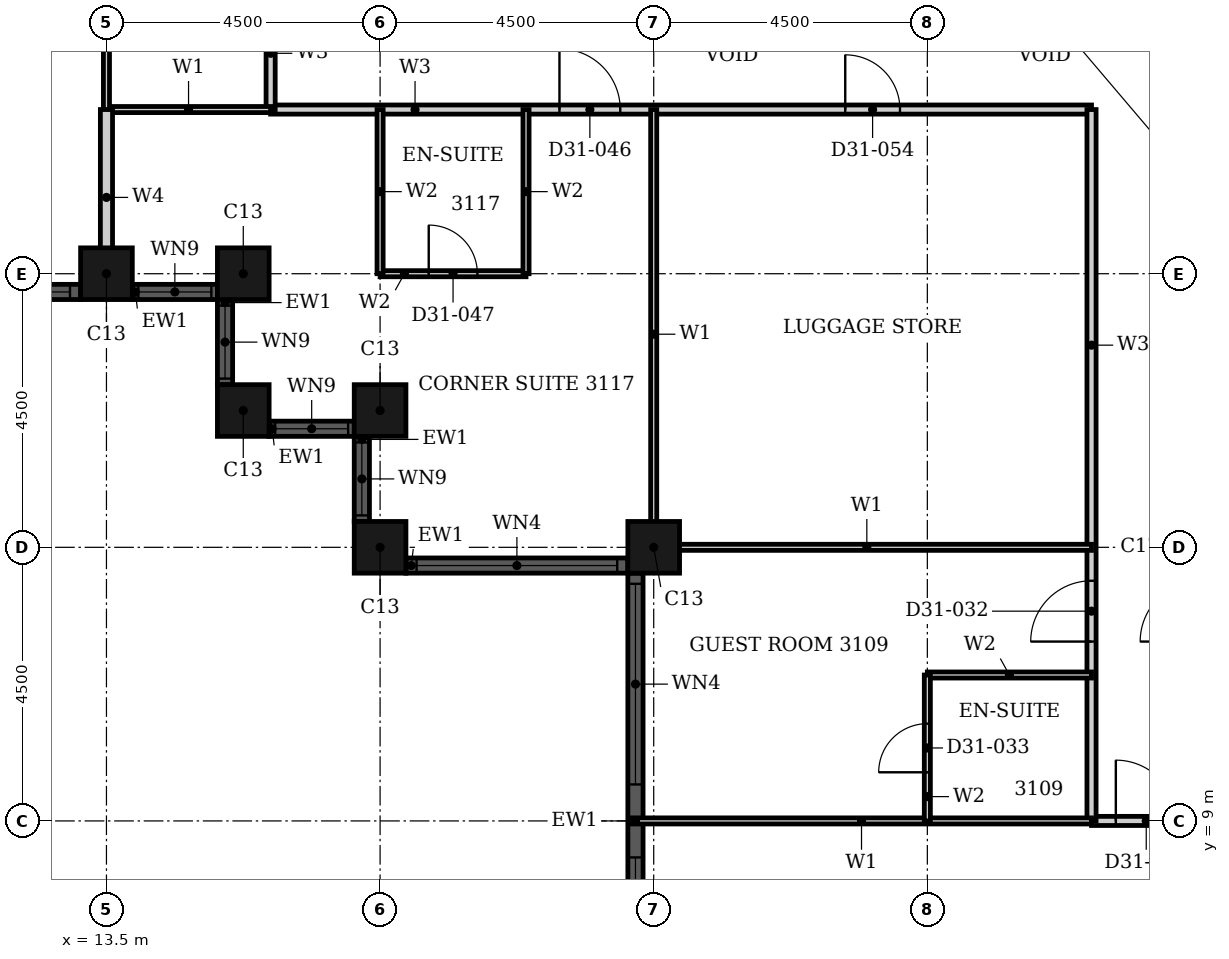
"""IFC4 building model, lengths in metres.
Left out: names, types, materials, properties, quantities, classifications, styles, units other than length and angle.
Written with IfcOpenShell. Run it as: python <this file> out.ifc"""

import sys

from ifc_helpers import new_model, si_unit, direction, frame, frame_2d, origin, origin_2d, place, context, subcontext, project, spatial, rectangle, hollow_rectangle, extrude, element, fill, save


model = new_model("IFC4")
c1 = context("Model", 3, precision=1e-05, world=origin(), true_north=direction((0.0, 1.0)))
c2 = subcontext(c1, "Body", "Model", "MODEL_VIEW")
j1 = project(units=[si_unit("LENGTHUNIT", "METRE"), si_unit("PLANEANGLEUNIT", "RADIAN")], contexts=[c1])
p1 = place(None, origin())
s1 = spatial("IfcSite", under=j1, at=p1, CompositionType="ELEMENT")
p2 = place(p1, origin())
s2 = spatial("IfcBuilding", under=s1, at=p2, CompositionType="ELEMENT")
p3 = place(p2, frame((0.0, 0.0, 126.0)))
s3 = spatial("IfcBuildingStorey", under=s2, at=p3, CompositionType="ELEMENT", Elevation=126.0)
for number, where, z_axis, x_axis in (
    (1, (13.5, 18.0, 0.0), (0.0, 0.0, 1.0), (1.0, 0.0, 0.0)),
    (2, (15.75, 18.0, 0.0), (0.0, 0.0, 1.0), (1.0, 0.0, 0.0)),
    (3, (15.75, 15.75, 0.0), (0.0, 0.0, 1.0), (1.0, 0.0, 0.0)),
    (4, (18.0, 15.75, 0.0), (0.0, 0.0, 1.0), (1.0, 0.0, 0.0)),
    (5, (18.0, 13.5, 0.0), (0.0, 0.0, 1.0), (1.0, 0.0, 0.0)),
    (6, (22.5, 13.5, 0.0), (0.0, 0.0, 1.0), (1.0, 0.0, 0.0)),
):
    element("IfcColumn", number, at=place(p3, frame(where, z_axis=z_axis, x_axis=x_axis)), inside=s3, PredefinedType="COLUMN", context=c2, shape_type="SweptSolid", body=[
        extrude(hollow_rectangle(XDim=0.85, YDim=0.85, WallThickness=0.026, at=origin_2d()), origin(), (0.0, 0.0, 1.0), 3.6),
    ])
p4 = place(p3, frame((4.925, 17.7, 0.0), z_axis=(0.0, 0.0, 1.0), x_axis=(1.0, 0.0, 0.0)))
e7 = element("IfcWall", 7, at=p4, inside=s3, PredefinedType="SOLIDWALL", context=c2, shape_type="SweptSolid", body=[
    extrude(rectangle(XDim=8.15, YDim=0.25, at=frame_2d((4.075, 0.0))), origin(), (0.0, 0.0, 1.0), 3.6),
])
p5 = place(p4, frame((0.175, 0.0, 0.9)))
e8 = element("IfcOpeningElement", 8, at=p5, cuts=e7, PredefinedType="OPENING", context=c2, shape_type="SweptSolid", body=[
    extrude(rectangle(XDim=3.3, YDim=2.08, at=frame_2d((1.65, 1.04))), frame((0.0, 0.135, 0.0), z_axis=(0.0, -1.0, 0.0), x_axis=(1.0, 0.0, 0.0)), (0.0, 0.0, 1.0), 0.27),
])
p6 = place(p4, frame((4.675, 0.0, 0.9)))
e9 = element("IfcOpeningElement", 9, at=p6, cuts=e7, PredefinedType="OPENING", context=c2, shape_type="SweptSolid", body=[
    extrude(rectangle(XDim=3.3, YDim=2.08, at=frame_2d((1.65, 1.04))), frame((0.0, 0.135, 0.0), z_axis=(0.0, -1.0, 0.0), x_axis=(1.0, 0.0, 0.0)), (0.0, 0.0, 1.0), 0.27),
])
p7 = place(p3, frame((13.925, 17.7, 0.0), z_axis=(0.0, 0.0, 1.0), x_axis=(1.0, 0.0, 0.0)))
e10 = element("IfcWall", 10, at=p7, inside=s3, PredefinedType="SOLIDWALL", context=c2, shape_type="SweptSolid", body=[
    extrude(rectangle(XDim=1.4, YDim=0.25, at=frame_2d((0.7, 0.0))), origin(), (0.0, 0.0, 1.0), 3.6),
])
p8 = place(p7, frame((0.1, 0.0, 0.9)))
e11 = element("IfcOpeningElement", 11, at=p8, cuts=e10, PredefinedType="OPENING", context=c2, shape_type="SweptSolid", body=[
    extrude(rectangle(XDim=1.2, YDim=2.08, at=frame_2d((0.6, 1.04))), frame((0.0, 0.135, 0.0), z_axis=(0.0, -1.0, 0.0), x_axis=(1.0, 0.0, 0.0)), (0.0, 0.0, 1.0), 0.27),
])
p9 = place(p3, frame((15.45, 17.575, 0.0), z_axis=(0.0, 0.0, 1.0), x_axis=(0.0, -1.0, 0.0)))
e12 = element("IfcWall", 12, at=p9, inside=s3, PredefinedType="SOLIDWALL", context=c2, shape_type="SweptSolid", body=[
    extrude(rectangle(XDim=1.4, YDim=0.25, at=frame_2d((0.7, 0.0))), origin(), (0.0, 0.0, 1.0), 3.6),
])
p10 = place(p9, frame((0.1, 0.0, 0.9)))
e13 = element("IfcOpeningElement", 13, at=p10, cuts=e12, PredefinedType="OPENING", context=c2, shape_type="SweptSolid", body=[
    extrude(rectangle(XDim=1.2, YDim=2.08, at=frame_2d((0.6, 1.04))), frame((0.0, 0.135, 0.0), z_axis=(0.0, -1.0, 0.0), x_axis=(1.0, 0.0, 0.0)), (0.0, 0.0, 1.0), 0.27),
])
p11 = place(p3, frame((16.175, 15.45, 0.0), z_axis=(0.0, 0.0, 1.0), x_axis=(1.0, 0.0, 0.0)))
e14 = element("IfcWall", 14, at=p11, inside=s3, PredefinedType="SOLIDWALL", context=c2, shape_type="SweptSolid", body=[
    extrude(rectangle(XDim=1.4, YDim=0.25, at=frame_2d((0.7, 0.0))), origin(), (0.0, 0.0, 1.0), 3.6),
])
p12 = place(p11, frame((0.1, 0.0, 0.9)))
e15 = element("IfcOpeningElement", 15, at=p12, cuts=e14, PredefinedType="OPENING", context=c2, shape_type="SweptSolid", body=[
    extrude(rectangle(XDim=1.2, YDim=2.08, at=frame_2d((0.6, 1.04))), frame((0.0, 0.135, 0.0), z_axis=(0.0, -1.0, 0.0), x_axis=(1.0, 0.0, 0.0)), (0.0, 0.0, 1.0), 0.27),
])
p13 = place(p3, frame((17.7, 15.325, 0.0), z_axis=(0.0, 0.0, 1.0), x_axis=(0.0, -1.0, 0.0)))
e16 = element("IfcWall", 16, at=p13, inside=s3, PredefinedType="SOLIDWALL", context=c2, shape_type="SweptSolid", body=[
    extrude(rectangle(XDim=1.4, YDim=0.25, at=frame_2d((0.7, 0.0))), origin(), (0.0, 0.0, 1.0), 3.6),
])
p14 = place(p13, frame((0.1, 0.0, 0.9)))
e17 = element("IfcOpeningElement", 17, at=p14, cuts=e16, PredefinedType="OPENING", context=c2, shape_type="SweptSolid", body=[
    extrude(rectangle(XDim=1.2, YDim=2.08, at=frame_2d((0.6, 1.04))), frame((0.0, 0.135, 0.0), z_axis=(0.0, -1.0, 0.0), x_axis=(1.0, 0.0, 0.0)), (0.0, 0.0, 1.0), 0.27),
])
p15 = place(p3, frame((18.425, 13.2, 0.0), z_axis=(0.0, 0.0, 1.0), x_axis=(1.0, 0.0, 0.0)))
e18 = element("IfcWall", 18, at=p15, inside=s3, PredefinedType="SOLIDWALL", context=c2, shape_type="SweptSolid", body=[
    extrude(rectangle(XDim=3.65, YDim=0.25, at=frame_2d((1.825, 0.0))), origin(), (0.0, 0.0, 1.0), 3.6),
])
p16 = place(p15, frame((0.175, 0.0, 0.9)))
e19 = element("IfcOpeningElement", 19, at=p16, cuts=e18, PredefinedType="OPENING", context=c2, shape_type="SweptSolid", body=[
    extrude(rectangle(XDim=3.3, YDim=2.08, at=frame_2d((1.65, 1.04))), frame((0.0, 0.135, 0.0), z_axis=(0.0, -1.0, 0.0), x_axis=(1.0, 0.0, 0.0)), (0.0, 0.0, 1.0), 0.27),
])
p17 = place(p3, frame((22.2, 13.075, 0.0), z_axis=(0.0, 0.0, 1.0), x_axis=(0.0, -1.0, 0.0)))
e20 = element("IfcWall", 20, at=p17, inside=s3, PredefinedType="SOLIDWALL", context=c2, shape_type="SweptSolid", body=[
    extrude(rectangle(XDim=8.15, YDim=0.25, at=frame_2d((4.075, 0.0))), origin(), (0.0, 0.0, 1.0), 3.6),
])
p18 = place(p17, frame((0.175, 0.0, 0.9)))
e21 = element("IfcOpeningElement", 21, at=p18, cuts=e20, PredefinedType="OPENING", context=c2, shape_type="SweptSolid", body=[
    extrude(rectangle(XDim=3.3, YDim=2.08, at=frame_2d((1.65, 1.04))), frame((0.0, 0.135, 0.0), z_axis=(0.0, -1.0, 0.0), x_axis=(1.0, 0.0, 0.0)), (0.0, 0.0, 1.0), 0.27),
])
p19 = place(p17, frame((4.675, 0.0, 0.9)))
e22 = element("IfcOpeningElement", 22, at=p19, cuts=e20, PredefinedType="OPENING", context=c2, shape_type="SweptSolid", body=[
    extrude(rectangle(XDim=3.3, YDim=2.08, at=frame_2d((1.65, 1.04))), frame((0.0, 0.135, 0.0), z_axis=(0.0, -1.0, 0.0), x_axis=(1.0, 0.0, 0.0)), (0.0, 0.0, 1.0), 0.27),
])
p20 = place(p3, frame((16.2, 20.7, 0.0), z_axis=(0.0, 0.0, 1.0), x_axis=(1.0, 0.0, 0.0)))
e23 = element("IfcWall", 23, at=p20, inside=s3, PredefinedType="PARTITIONING", context=c2, shape_type="SweptSolid", body=[
    extrude(rectangle(XDim=13.5, YDim=0.15, at=frame_2d((6.75, 0.0))), origin(), (0.0, 0.0, 1.0), 3.3),
])
p21 = place(p20, frame((4.75, 0.0, 0.0)))
e24 = element("IfcOpeningElement", 24, at=p21, cuts=e23, PredefinedType="OPENING", context=c2, shape_type="SweptSolid", body=[
    extrude(rectangle(XDim=1.0, YDim=2.1, at=frame_2d((0.5, 1.05))), frame((0.0, 0.085, 0.0), z_axis=(0.0, -1.0, 0.0), x_axis=(1.0, 0.0, 0.0)), (0.0, 0.0, 1.0), 0.17),
])
p22 = place(p20, frame((9.45, 0.0, 0.0)))
e25 = element("IfcOpeningElement", 25, at=p22, cuts=e23, PredefinedType="OPENING", context=c2, shape_type="SweptSolid", body=[
    extrude(rectangle(XDim=0.9, YDim=2.1, at=frame_2d((0.45, 1.05))), frame((0.0, 0.085, 0.0), z_axis=(0.0, -1.0, 0.0), x_axis=(1.0, 0.0, 0.0)), (0.0, 0.0, 1.0), 0.17),
])
p23 = place(p3, frame((29.7, 9.0, 0.0), z_axis=(0.0, 0.0, 1.0), x_axis=(1.0, 0.0, 0.0)))
e26 = element("IfcWall", 26, at=p23, inside=s3, PredefinedType="PARTITIONING", context=c2, shape_type="SweptSolid", body=[
    extrude(rectangle(XDim=1.8, YDim=0.15, at=frame_2d((0.9, 0.0))), origin(), (0.0, 0.0, 1.0), 3.3),
])
p24 = place(p23, frame((0.4, 0.0, 0.0)))
e27 = element("IfcOpeningElement", 27, at=p24, cuts=e26, PredefinedType="OPENING", context=c2, shape_type="SweptSolid", body=[
    extrude(rectangle(XDim=1.0, YDim=2.1, at=frame_2d((0.5, 1.05))), frame((0.0, 0.085, 0.0), z_axis=(0.0, -1.0, 0.0), x_axis=(1.0, 0.0, 0.0)), (0.0, 0.0, 1.0), 0.17),
])
p25 = place(p3, frame((16.2, 20.7, 0.0), z_axis=(0.0, 0.0, 1.0), x_axis=(0.0, 1.0, 0.0)))
e28 = element("IfcWall", 28, at=p25, inside=s3, PredefinedType="PARTITIONING", context=c2, shape_type="SweptSolid", body=[
    extrude(rectangle(XDim=4.5, YDim=0.15, at=frame_2d((2.25, 0.0))), origin(), (0.0, 0.0, 1.0), 3.3),
])
p26 = place(p25, frame((1.85, 0.0, 0.0)))
e29 = element("IfcOpeningElement", 29, at=p26, cuts=e28, PredefinedType="OPENING", context=c2, shape_type="SweptSolid", body=[
    extrude(rectangle(XDim=0.9, YDim=2.1, at=frame_2d((0.45, 1.05))), frame((0.0, 0.085, 0.0), z_axis=(0.0, -1.0, 0.0), x_axis=(1.0, 0.0, 0.0)), (0.0, 0.0, 1.0), 0.17),
])
p27 = place(p3, frame((29.7, 9.0, 0.0), z_axis=(0.0, 0.0, 1.0), x_axis=(0.0, 1.0, 0.0)))
e30 = element("IfcWall", 30, at=p27, inside=s3, PredefinedType="PARTITIONING", context=c2, shape_type="SweptSolid", body=[
    extrude(rectangle(XDim=11.7, YDim=0.15, at=frame_2d((5.85, 0.0))), origin(), (0.0, 0.0, 1.0), 3.3),
])
p28 = place(p27, frame((2.95, 0.0, 0.0)))
e31 = element("IfcOpeningElement", 31, at=p28, cuts=e30, PredefinedType="OPENING", context=c2, shape_type="SweptSolid", body=[
    extrude(rectangle(XDim=1.0, YDim=2.1, at=frame_2d((0.5, 1.05))), frame((0.0, 0.085, 0.0), z_axis=(0.0, -1.0, 0.0), x_axis=(1.0, 0.0, 0.0)), (0.0, 0.0, 1.0), 0.17),
])
p29 = place(p3, frame((22.31, 13.5, 0.0), z_axis=(0.0, 0.0, 1.0), x_axis=(1.0, 0.0, 0.0)))
e32 = element("IfcWall", 32, at=p29, inside=s3, PredefinedType="PARTITIONING", context=c2, shape_type="SweptSolid", body=[
    extrude(rectangle(XDim=7.39, YDim=0.1, at=frame_2d((3.695, 0.0))), origin(), (0.0, 0.0, 1.0), 2.38),
])
p30 = place(p3, frame((13.5, 20.7, 0.0), z_axis=(0.0, 0.0, 1.0), x_axis=(1.0, 0.0, 0.0)))
e33 = element("IfcWall", 33, at=p30, inside=s3, PredefinedType="PARTITIONING", context=c2, shape_type="SweptSolid", body=[
    extrude(rectangle(XDim=2.7, YDim=0.1, at=frame_2d((1.35, 0.0))), origin(), (0.0, 0.0, 1.0), 3.3),
])
p31 = place(p3, frame((22.135, 9.0, 0.0), z_axis=(0.0, 0.0, 1.0), x_axis=(1.0, 0.0, 0.0)))
e34 = element("IfcWall", 34, at=p31, inside=s3, PredefinedType="PARTITIONING", context=c2, shape_type="SweptSolid", body=[
    extrude(rectangle(XDim=7.565, YDim=0.1, at=frame_2d((3.782, 0.0))), origin(), (0.0, 0.0, 1.0), 3.3),
])
p32 = place(p3, frame((13.5, 20.7, 0.0), z_axis=(0.0, 0.0, 1.0), x_axis=(0.0, 1.0, 0.0)))
e35 = element("IfcWall", 35, at=p32, inside=s3, PredefinedType="PARTITIONING", context=c2, shape_type="SweptSolid", body=[
    extrude(rectangle(XDim=4.5, YDim=0.1, at=frame_2d((2.25, 0.0))), origin(), (0.0, 0.0, 1.0), 2.38),
])
p33 = place(p3, frame((22.5, 13.31, 0.0), z_axis=(0.0, 0.0, 1.0), x_axis=(0.0, 1.0, 0.0)))
e36 = element("IfcWall", 36, at=p33, inside=s3, PredefinedType="PARTITIONING", context=c2, shape_type="SweptSolid", body=[
    extrude(rectangle(XDim=7.39, YDim=0.1, at=frame_2d((3.695, 0.0))), origin(), (0.0, 0.0, 1.0), 3.3),
])
p34 = place(p3, frame((13.5, 17.81, 0.0), z_axis=(0.0, 0.0, 1.0), x_axis=(0.0, 1.0, 0.0)))
e37 = element("IfcWall", 37, at=p34, inside=s3, PredefinedType="PARTITIONING", context=c2, shape_type="SweptSolid", body=[
    extrude(rectangle(XDim=2.89, YDim=0.2, at=frame_2d((1.445, 0.0))), origin(), (0.0, 0.0, 1.0), 2.38),
])
p35 = place(p3, frame((27.0, 11.4, 0.0), z_axis=(0.0, 0.0, 1.0), x_axis=(1.0, 0.0, 0.0)))
e38 = element("IfcWall", 38, at=p35, inside=s3, PredefinedType="PARTITIONING", context=c2, shape_type="SweptSolid", body=[
    extrude(rectangle(XDim=2.7, YDim=0.1, at=frame_2d((1.35, 0.0))), origin(), (0.0, 0.0, 1.0), 3.3),
])
p36 = place(p3, frame((18.0, 18.0, 0.0), z_axis=(0.0, 0.0, 1.0), x_axis=(1.0, 0.0, 0.0)))
e39 = element("IfcWall", 39, at=p36, inside=s3, PredefinedType="PARTITIONING", context=c2, shape_type="SweptSolid", body=[
    extrude(rectangle(XDim=2.4, YDim=0.1, at=frame_2d((1.2, 0.0))), origin(), (0.0, 0.0, 1.0), 3.3),
])
p37 = place(p36, frame((0.8, 0.0, 0.0)))
e40 = element("IfcOpeningElement", 40, at=p37, cuts=e39, PredefinedType="OPENING", context=c2, shape_type="SweptSolid", body=[
    extrude(rectangle(XDim=0.8, YDim=2.1, at=frame_2d((0.4, 1.05))), frame((0.0, 0.06, 0.0), z_axis=(0.0, -1.0, 0.0), x_axis=(1.0, 0.0, 0.0)), (0.0, 0.0, 1.0), 0.12),
])
for number, where, z_axis, x_axis in (
    (41, (18.0, 18.0, 0.0), (0.0, 0.0, 1.0), (0.0, 1.0, 0.0)),
    (42, (20.4, 18.0, 0.0), (0.0, 0.0, 1.0), (0.0, 1.0, 0.0)),
):
    element("IfcWall", number, at=place(p3, frame(where, z_axis=z_axis, x_axis=x_axis)), inside=s3, PredefinedType="PARTITIONING", context=c2, shape_type="SweptSolid", body=[
        extrude(rectangle(XDim=2.7, YDim=0.1, at=frame_2d((1.35, 0.0))), origin(), (0.0, 0.0, 1.0), 3.3),
    ])
p38 = place(p3, frame((27.0, 9.0, 0.0), z_axis=(0.0, 0.0, 1.0), x_axis=(0.0, 1.0, 0.0)))
e43 = element("IfcWall", 43, at=p38, inside=s3, PredefinedType="PARTITIONING", context=c2, shape_type="SweptSolid", body=[
    extrude(rectangle(XDim=2.4, YDim=0.1, at=frame_2d((1.2, 0.0))), origin(), (0.0, 0.0, 1.0), 2.58),
])
p39 = place(p38, frame((0.8, 0.0, 0.0)))
e44 = element("IfcOpeningElement", 44, at=p39, cuts=e43, PredefinedType="OPENING", context=c2, shape_type="SweptSolid", body=[
    extrude(rectangle(XDim=0.8, YDim=2.1, at=frame_2d((0.4, 1.05))), frame((0.0, 0.06, 0.0), z_axis=(0.0, -1.0, 0.0), x_axis=(1.0, 0.0, 0.0)), (0.0, 0.0, 1.0), 0.12),
])
p40 = place(p6, origin())
e45 = element("IfcWindow", 45, at=p40, inside=s3, PartitioningType="SINGLE_PANEL", PredefinedType="WINDOW", context=c2, shape_type="SweptSolid", body=[
    extrude(rectangle(XDim=3.3, YDim=2.08, at=frame_2d((1.65, 1.04))), frame((0.0, 0.03, 0.0), z_axis=(0.0, -1.0, 0.0), x_axis=(1.0, 0.0, 0.0)), (0.0, 0.0, 1.0), 0.06),
])
fill(e9, e45)
p41 = place(p8, origin())
e46 = element("IfcWindow", 46, at=p41, inside=s3, PartitioningType="SINGLE_PANEL", PredefinedType="WINDOW", context=c2, shape_type="SweptSolid", body=[
    extrude(rectangle(XDim=1.2, YDim=2.08, at=frame_2d((0.6, 1.04))), frame((0.0, 0.03, 0.0), z_axis=(0.0, -1.0, 0.0), x_axis=(1.0, 0.0, 0.0)), (0.0, 0.0, 1.0), 0.06),
])
fill(e11, e46)
p42 = place(p10, origin())
e47 = element("IfcWindow", 47, at=p42, inside=s3, PartitioningType="SINGLE_PANEL", PredefinedType="WINDOW", context=c2, shape_type="SweptSolid", body=[
    extrude(rectangle(XDim=1.2, YDim=2.08, at=frame_2d((0.6, 1.04))), frame((0.0, 0.03, 0.0), z_axis=(0.0, -1.0, 0.0), x_axis=(1.0, 0.0, 0.0)), (0.0, 0.0, 1.0), 0.06),
])
fill(e13, e47)
p43 = place(p12, origin())
e48 = element("IfcWindow", 48, at=p43, inside=s3, PartitioningType="SINGLE_PANEL", PredefinedType="WINDOW", context=c2, shape_type="SweptSolid", body=[
    extrude(rectangle(XDim=1.2, YDim=2.08, at=frame_2d((0.6, 1.04))), frame((0.0, 0.03, 0.0), z_axis=(0.0, -1.0, 0.0), x_axis=(1.0, 0.0, 0.0)), (0.0, 0.0, 1.0), 0.06),
])
fill(e15, e48)
p44 = place(p14, origin())
e49 = element("IfcWindow", 49, at=p44, inside=s3, PartitioningType="SINGLE_PANEL", PredefinedType="WINDOW", context=c2, shape_type="SweptSolid", body=[
    extrude(rectangle(XDim=1.2, YDim=2.08, at=frame_2d((0.6, 1.04))), frame((0.0, 0.03, 0.0), z_axis=(0.0, -1.0, 0.0), x_axis=(1.0, 0.0, 0.0)), (0.0, 0.0, 1.0), 0.06),
])
fill(e17, e49)
p45 = place(p16, origin())
e50 = element("IfcWindow", 50, at=p45, inside=s3, PartitioningType="SINGLE_PANEL", PredefinedType="WINDOW", context=c2, shape_type="SweptSolid", body=[
    extrude(rectangle(XDim=3.3, YDim=2.08, at=frame_2d((1.65, 1.04))), frame((0.0, 0.03, 0.0), z_axis=(0.0, -1.0, 0.0), x_axis=(1.0, 0.0, 0.0)), (0.0, 0.0, 1.0), 0.06),
])
fill(e19, e50)
p46 = place(p18, origin())
e51 = element("IfcWindow", 51, at=p46, inside=s3, PartitioningType="SINGLE_PANEL", PredefinedType="WINDOW", context=c2, shape_type="SweptSolid", body=[
    extrude(rectangle(XDim=3.3, YDim=2.08, at=frame_2d((1.65, 1.04))), frame((0.0, 0.03, 0.0), z_axis=(0.0, -1.0, 0.0), x_axis=(1.0, 0.0, 0.0)), (0.0, 0.0, 1.0), 0.06),
])
fill(e21, e51)
p47 = place(p19, origin())
e52 = element("IfcWindow", 52, at=p47, inside=s3, PartitioningType="SINGLE_PANEL", PredefinedType="WINDOW", context=c2, shape_type="SweptSolid", body=[
    extrude(rectangle(XDim=3.3, YDim=2.08, at=frame_2d((1.65, 1.04))), frame((0.0, 0.03, 0.0), z_axis=(0.0, -1.0, 0.0), x_axis=(1.0, 0.0, 0.0)), (0.0, 0.0, 1.0), 0.06),
])
fill(e22, e52)
p48 = place(p28, origin())
e53 = element("IfcDoor", 53, at=p48, inside=s3, OperationType="SINGLE_SWING_RIGHT", PredefinedType="DOOR", context=c2, shape_type="SweptSolid", body=[
    extrude(rectangle(XDim=1.0, YDim=2.1, at=frame_2d((0.5, 1.05))), frame((0.0, 0.025, 0.0), z_axis=(0.0, -1.0, 0.0), x_axis=(1.0, 0.0, 0.0)), (0.0, 0.0, 1.0), 0.05),
])
fill(e31, e53)
p49 = place(p39, origin())
e54 = element("IfcDoor", 54, at=p49, inside=s3, OperationType="SINGLE_SWING_LEFT", PredefinedType="DOOR", context=c2, shape_type="SweptSolid", body=[
    extrude(rectangle(XDim=0.8, YDim=2.1, at=frame_2d((0.4, 1.05))), frame((0.0, 0.025, 0.0), z_axis=(0.0, -1.0, 0.0), x_axis=(1.0, 0.0, 0.0)), (0.0, 0.0, 1.0), 0.05),
])
fill(e44, e54)
p50 = place(p24, origin())
e55 = element("IfcDoor", 55, at=p50, inside=s3, OperationType="SINGLE_SWING_LEFT", PredefinedType="DOOR", context=c2, shape_type="SweptSolid", body=[
    extrude(rectangle(XDim=1.0, YDim=2.1, at=frame_2d((0.5, 1.05))), frame((0.0, 0.025, 0.0), z_axis=(0.0, -1.0, 0.0), x_axis=(1.0, 0.0, 0.0)), (0.0, 0.0, 1.0), 0.05),
])
fill(e27, e55)
p51 = place(p21, origin())
e56 = element("IfcDoor", 56, at=p51, inside=s3, OperationType="SINGLE_SWING_RIGHT", PredefinedType="DOOR", context=c2, shape_type="SweptSolid", body=[
    extrude(rectangle(XDim=1.0, YDim=2.1, at=frame_2d((0.5, 1.05))), frame((0.0, 0.025, 0.0), z_axis=(0.0, -1.0, 0.0), x_axis=(1.0, 0.0, 0.0)), (0.0, 0.0, 1.0), 0.05),
])
fill(e24, e56)
p52 = place(p37, origin())
e57 = element("IfcDoor", 57, at=p52, inside=s3, OperationType="SINGLE_SWING_RIGHT", PredefinedType="DOOR", context=c2, shape_type="SweptSolid", body=[
    extrude(rectangle(XDim=0.8, YDim=2.1, at=frame_2d((0.4, 1.05))), frame((0.0, 0.025, 0.0), z_axis=(0.0, -1.0, 0.0), x_axis=(1.0, 0.0, 0.0)), (0.0, 0.0, 1.0), 0.05),
])
fill(e40, e57)
p53 = place(p22, origin())
e58 = element("IfcDoor", 58, at=p53, inside=s3, OperationType="SINGLE_SWING_RIGHT", PredefinedType="DOOR", context=c2, shape_type="SweptSolid", body=[
    extrude(rectangle(XDim=0.9, YDim=2.1, at=frame_2d((0.45, 1.05))), frame((0.0, 0.025, 0.0), z_axis=(0.0, -1.0, 0.0), x_axis=(1.0, 0.0, 0.0)), (0.0, 0.0, 1.0), 0.05),
])
fill(e25, e58)
save(model, sys.argv[1])
